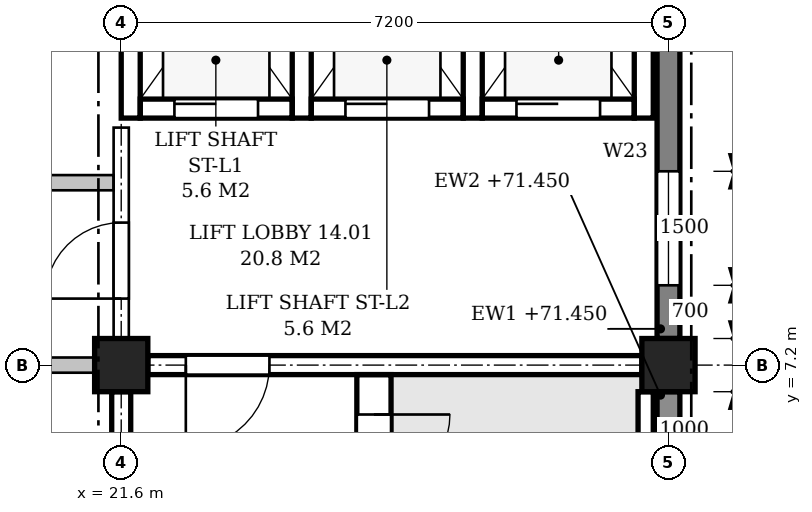
"""IFC4 building model, lengths in metres.
Left out: names, types, materials, properties, quantities, classifications, styles, units other than length and angle.
Written with IfcOpenShell. Run it as: python <this file> out.ifc"""

import sys

from ifc_helpers import new_model, si_unit, direction, frame, frame_2d, origin, origin_2d, place, context, subcontext, project, spatial, polyline, rectangle, outline, extrude, element, fill, save


model = new_model("IFC4")
c1 = context("Model", 3, precision=1e-05, world=origin(), true_north=direction((0.0, 1.0)))
c2 = subcontext(c1, "Body", "Model", "MODEL_VIEW")
j1 = project(units=[si_unit("LENGTHUNIT", "METRE"), si_unit("PLANEANGLEUNIT", "RADIAN")], contexts=[c1])
p1 = place(None, origin())
s1 = spatial("IfcSite", under=j1, at=p1, CompositionType="ELEMENT")
p2 = place(p1, origin())
s2 = spatial("IfcBuilding", under=s1, at=p2, CompositionType="ELEMENT")
p3 = place(p2, frame((0.0, 0.0, 67.8)))
s3 = spatial("IfcBuildingStorey", under=s2, at=p3, CompositionType="ELEMENT", Elevation=67.8)
for number, where, z_axis, x_axis in (
    (1, (21.6, 7.2, 0.0), (0.0, 0.0, 1.0), (1.0, 0.0, 0.0)),
    (2, (28.8, 7.2, 0.0), (0.0, 0.0, 1.0), (1.0, 0.0, 0.0)),
):
    element("IfcColumn", number, at=place(p3, frame(where, z_axis=z_axis, x_axis=x_axis)), inside=s3, PredefinedType="COLUMN", context=c2, shape_type="SweptSolid", body=[
        extrude(rectangle(XDim=0.7, YDim=0.7, at=origin_2d()), origin(), (0.0, 0.0, 1.0), 4.5),
    ])
p4 = place(p3, frame((28.8, 0.35, 0.0), z_axis=(0.0, 0.0, 1.0), x_axis=(0.0, 1.0, 0.0)))
e3 = element("IfcWall", 3, at=p4, inside=s3, PredefinedType="STANDARD", context=c2, shape_type="SweptSolid", body=[
    extrude(rectangle(XDim=6.5, YDim=0.3, at=frame_2d((3.25, 0.0))), origin(), (0.0, 0.0, 1.0), 3.65),
])
p5 = place(p4, frame((1.0, 0.0, 0.9)))
e4 = element("IfcOpeningElement", 4, at=p5, cuts=e3, PredefinedType="OPENING", context=c2, shape_type="SweptSolid", body=[
    extrude(outline(polyline([(0.0, 0.0), (0.9, 0.0), (0.9, 2.25), (0.45, 2.7), (0.0, 2.25), (0.0, 0.0)])), frame((0.0, 0.16, 0.0), z_axis=(0.0, -1.0, 0.0), x_axis=(1.0, 0.0, 0.0)), (0.0, 0.0, 1.0), 0.32),
])
p6 = place(p4, frame((4.6, 0.0, 0.9)))
e5 = element("IfcOpeningElement", 5, at=p6, cuts=e3, PredefinedType="OPENING", context=c2, shape_type="SweptSolid", body=[
    extrude(outline(polyline([(0.0, 0.0), (0.9, 0.0), (0.9, 2.25), (0.45, 2.7), (0.0, 2.25), (0.0, 0.0)])), frame((0.0, 0.16, 0.0), z_axis=(0.0, -1.0, 0.0), x_axis=(1.0, 0.0, 0.0)), (0.0, 0.0, 1.0), 0.32),
])
p7 = place(p3, frame((28.8, 7.55, 0.0), z_axis=(0.0, 0.0, 1.0), x_axis=(0.0, 1.0, 0.0)))
e6 = element("IfcWall", 6, at=p7, inside=s3, PredefinedType="STANDARD", context=c2, shape_type="SweptSolid", body=[
    extrude(rectangle(XDim=6.5, YDim=0.3, at=frame_2d((3.25, 0.0))), origin(), (0.0, 0.0, 1.0), 3.65),
])
p8 = place(p7, frame((0.7, 0.0, 0.9)))
e7 = element("IfcOpeningElement", 7, at=p8, cuts=e6, PredefinedType="OPENING", context=c2, shape_type="SweptSolid", body=[
    extrude(outline(polyline([(0.0, 0.0), (1.5, 0.0), (1.5, 1.95), (0.75, 2.7), (0.0, 1.95), (0.0, 0.0)])), frame((0.0, 0.16, 0.0), z_axis=(0.0, -1.0, 0.0), x_axis=(1.0, 0.0, 0.0)), (0.0, 0.0, 1.0), 0.32),
])
p9 = place(p3, frame((21.95, 7.2, 0.0), z_axis=(0.0, 0.0, 1.0), x_axis=(1.0, 0.0, 0.0)))
e8 = element("IfcWall", 8, at=p9, inside=s3, PredefinedType="SHEAR", context=c2, shape_type="SweptSolid", body=[
    extrude(rectangle(XDim=6.5, YDim=0.25, at=frame_2d((3.25, 0.0))), origin(), (0.0, 0.0, 1.0), 3.6),
])
p10 = place(p9, frame((0.5, 0.0, 0.0)))
e9 = element("IfcOpeningElement", 9, at=p10, cuts=e8, PredefinedType="OPENING", context=c2, shape_type="SweptSolid", body=[
    extrude(rectangle(XDim=1.1, YDim=2.1, at=frame_2d((0.55, 1.05))), frame((0.0, 0.135, 0.0), z_axis=(0.0, -1.0, 0.0), x_axis=(1.0, 0.0, 0.0)), (0.0, 0.0, 1.0), 0.27),
])
p11 = place(p3, frame((21.6, 0.35, 0.0), z_axis=(0.0, 0.0, 1.0), x_axis=(0.0, 1.0, 0.0)))
e10 = element("IfcWall", 10, at=p11, inside=s3, PredefinedType="SHEAR", context=c2, shape_type="SweptSolid", body=[
    extrude(rectangle(XDim=6.5, YDim=0.25, at=frame_2d((3.25, 0.0))), origin(), (0.0, 0.0, 1.0), 3.6),
])
p12 = place(p3, frame((28.5, 5.85, -0.25), z_axis=(0.0, 0.0, 1.0), x_axis=(0.0, 1.0, 0.0)))
e11 = element("IfcWall", 11, at=p12, inside=s3, PredefinedType="SHEAR", context=c2, shape_type="SweptSolid", body=[
    extrude(rectangle(XDim=1.0, YDim=0.2, at=frame_2d((0.5, 0.0))), origin(), (0.0, 0.0, 1.0), 4.5),
])
p13 = place(p3, frame((24.925, 0.15, 0.0), z_axis=(0.0, 0.0, 1.0), x_axis=(0.0, 1.0, 0.0)))
e12 = element("IfcWall", 12, at=p13, inside=s3, PredefinedType="SHEAR", context=c2, shape_type="SweptSolid", body=[
    extrude(rectangle(XDim=6.925, YDim=0.45, at=frame_2d((3.462, 0.0))), origin(), (0.0, 0.0, 1.0), 4.25),
])
p14 = place(p13, frame((5.4, 0.0, 0.0)))
e13 = element("IfcOpeningElement", 13, at=p14, cuts=e12, PredefinedType="OPENING", context=c2, shape_type="SweptSolid", body=[
    extrude(rectangle(XDim=1.0, YDim=2.1, at=frame_2d((0.5, 1.05))), frame((0.0, 0.235, 0.0), z_axis=(0.0, -1.0, 0.0), x_axis=(1.0, 0.0, 0.0)), (0.0, 0.0, 1.0), 0.47),
])
p15 = place(p3, frame((21.725, 10.45, -0.25), z_axis=(0.0, 0.0, 1.0), x_axis=(0.0, 1.0, 0.0)))
e14 = element("IfcWall", 14, at=p15, inside=s3, PredefinedType="SHEAR", context=c2, shape_type="SweptSolid", body=[
    extrude(rectangle(XDim=3.6, YDim=0.25, at=frame_2d((1.8, 0.0))), origin(), (0.0, 0.0, 1.0), 3.85),
])
for number, where, z_axis, x_axis in (
    (15, (23.975, 10.45, -0.25), (0.0, 0.0, 1.0), (0.0, 1.0, 0.0)),
    (16, (26.225, 10.45, -0.25), (0.0, 0.0, 1.0), (0.0, 1.0, 0.0)),
):
    element("IfcWall", number, at=place(p3, frame(where, z_axis=z_axis, x_axis=x_axis)), inside=s3, PredefinedType="SHEAR", context=c2, shape_type="SweptSolid", body=[
        extrude(rectangle(XDim=3.3, YDim=0.25, at=frame_2d((1.65, 0.0))), origin(), (0.0, 0.0, 1.0), 4.5),
    ])
p16 = place(p3, frame((28.475, 10.45, -0.25), z_axis=(0.0, 0.0, 1.0), x_axis=(0.0, 1.0, 0.0)))
e17 = element("IfcWall", 17, at=p16, inside=s3, PredefinedType="SHEAR", context=c2, shape_type="SweptSolid", body=[
    extrude(rectangle(XDim=3.6, YDim=0.25, at=frame_2d((1.8, 0.0))), origin(), (0.0, 0.0, 1.0), 4.5),
])
p17 = place(p3, frame((21.85, 10.575, -0.25), z_axis=(0.0, 0.0, 1.0), x_axis=(1.0, 0.0, 0.0)))
e18 = element("IfcWall", 18, at=p17, inside=s3, PredefinedType="SHEAR", context=c2, shape_type="SweptSolid", body=[
    extrude(rectangle(XDim=2.0, YDim=0.25, at=frame_2d((1.0, 0.0))), origin(), (0.0, 0.0, 1.0), 4.5),
])
p18 = place(p17, frame((0.45, 0.0, 0.25)))
e19 = element("IfcOpeningElement", 19, at=p18, cuts=e18, PredefinedType="OPENING", context=c2, shape_type="SweptSolid", body=[
    extrude(rectangle(XDim=1.1, YDim=2.1, at=frame_2d((0.55, 1.05))), frame((0.0, 0.135, 0.0), z_axis=(0.0, -1.0, 0.0), x_axis=(1.0, 0.0, 0.0)), (0.0, 0.0, 1.0), 0.27),
])
p19 = place(p3, frame((24.1, 10.575, -0.25), z_axis=(0.0, 0.0, 1.0), x_axis=(1.0, 0.0, 0.0)))
e20 = element("IfcWall", 20, at=p19, inside=s3, PredefinedType="SHEAR", context=c2, shape_type="SweptSolid", body=[
    extrude(rectangle(XDim=2.0, YDim=0.25, at=frame_2d((1.0, 0.0))), origin(), (0.0, 0.0, 1.0), 4.5),
])
p20 = place(p19, frame((0.45, 0.0, 0.25)))
e21 = element("IfcOpeningElement", 21, at=p20, cuts=e20, PredefinedType="OPENING", context=c2, shape_type="SweptSolid", body=[
    extrude(rectangle(XDim=1.1, YDim=2.1, at=frame_2d((0.55, 1.05))), frame((0.0, 0.135, 0.0), z_axis=(0.0, -1.0, 0.0), x_axis=(1.0, 0.0, 0.0)), (0.0, 0.0, 1.0), 0.27),
])
p21 = place(p3, frame((26.35, 10.575, -0.25), z_axis=(0.0, 0.0, 1.0), x_axis=(1.0, 0.0, 0.0)))
e22 = element("IfcWall", 22, at=p21, inside=s3, PredefinedType="SHEAR", context=c2, shape_type="SweptSolid", body=[
    extrude(rectangle(XDim=2.0, YDim=0.25, at=frame_2d((1.0, 0.0))), origin(), (0.0, 0.0, 1.0), 4.5),
])
p22 = place(p21, frame((0.45, 0.0, 0.25)))
e23 = element("IfcOpeningElement", 23, at=p22, cuts=e22, PredefinedType="OPENING", context=c2, shape_type="SweptSolid", body=[
    extrude(rectangle(XDim=1.1, YDim=2.1, at=frame_2d((0.55, 1.05))), frame((0.0, 0.135, 0.0), z_axis=(0.0, -1.0, 0.0), x_axis=(1.0, 0.0, 0.0)), (0.0, 0.0, 1.0), 0.27),
])
p23 = place(p3, frame((14.75, 7.2, 0.0), z_axis=(0.0, 0.0, 1.0), x_axis=(1.0, 0.0, 0.0)))
e24 = element("IfcWall", 24, at=p23, inside=s3, PredefinedType="PARTITIONING", context=c2, shape_type="SweptSolid", body=[
    extrude(rectangle(XDim=6.5, YDim=0.2, at=frame_2d((3.25, 0.0))), origin(), (0.0, 0.0, 1.0), 3.6),
])
p24 = place(p23, frame((4.375, 0.0, 0.0)))
e25 = element("IfcOpeningElement", 25, at=p24, cuts=e24, PredefinedType="OPENING", context=c2, shape_type="SweptSolid", body=[
    extrude(rectangle(XDim=1.0, YDim=2.1, at=frame_2d((0.5, 1.05))), frame((0.0, 0.11, 0.0), z_axis=(0.0, -1.0, 0.0), x_axis=(1.0, 0.0, 0.0)), (0.0, 0.0, 1.0), 0.22),
])
p25 = place(p3, frame((3.5, 9.6, 0.0), z_axis=(0.0, 0.0, 1.0), x_axis=(1.0, 0.0, 0.0)))
e26 = element("IfcWall", 26, at=p25, inside=s3, PredefinedType="PARTITIONING", context=c2, shape_type="SweptSolid", body=[
    extrude(outline(polyline([(0.0, 0.0), (18.0, 0.0), (18.0, 3.6), (17.9, 3.6), (17.9, 4.25), (11.1, 4.25), (11.1, 3.6), (10.7, 3.6), (10.7, 4.25), (3.9, 4.25), (3.9, 3.6), (3.5, 3.6), (3.5, 4.25), (0.0, 4.25), (0.0, 0.0)])), frame((0.0, 0.1, 0.0), z_axis=(0.0, -1.0, 0.0), x_axis=(1.0, 0.0, 0.0)), (0.0, 0.0, 1.0), 0.2),
])
p26 = place(p25, frame((15.75, 0.0, 0.0)))
e27 = element("IfcOpeningElement", 27, at=p26, cuts=e26, PredefinedType="OPENING", context=c2, shape_type="SweptSolid", body=[
    extrude(rectangle(XDim=1.0, YDim=2.1, at=frame_2d((0.5, 1.05))), frame((0.0, 0.11, 0.0), z_axis=(0.0, -1.0, 0.0), x_axis=(1.0, 0.0, 0.0)), (0.0, 0.0, 1.0), 0.22),
])
p27 = place(p25, frame((1.4, 0.0, 0.0)))
e28 = element("IfcOpeningElement", 28, at=p27, cuts=e26, PredefinedType="OPENING", context=c2, shape_type="SweptSolid", body=[
    extrude(rectangle(XDim=1.0, YDim=2.1, at=frame_2d((0.5, 1.05))), frame((0.0, 0.11, 0.0), z_axis=(0.0, -1.0, 0.0), x_axis=(1.0, 0.0, 0.0)), (0.0, 0.0, 1.0), 0.22),
])
p28 = place(p25, frame((5.0, 0.0, 0.0)))
e29 = element("IfcOpeningElement", 29, at=p28, cuts=e26, PredefinedType="OPENING", context=c2, shape_type="SweptSolid", body=[
    extrude(rectangle(XDim=1.0, YDim=2.1, at=frame_2d((0.5, 1.05))), frame((0.0, 0.11, 0.0), z_axis=(0.0, -1.0, 0.0), x_axis=(1.0, 0.0, 0.0)), (0.0, 0.0, 1.0), 0.22),
])
p29 = place(p25, frame((8.6, 0.0, 0.0)))
e30 = element("IfcOpeningElement", 30, at=p29, cuts=e26, PredefinedType="OPENING", context=c2, shape_type="SweptSolid", body=[
    extrude(rectangle(XDim=1.0, YDim=2.1, at=frame_2d((0.5, 1.05))), frame((0.0, 0.11, 0.0), z_axis=(0.0, -1.0, 0.0), x_axis=(1.0, 0.0, 0.0)), (0.0, 0.0, 1.0), 0.22),
])
p30 = place(p25, frame((12.2, 0.0, 0.0)))
e31 = element("IfcOpeningElement", 31, at=p30, cuts=e26, PredefinedType="OPENING", context=c2, shape_type="SweptSolid", body=[
    extrude(rectangle(XDim=1.0, YDim=2.1, at=frame_2d((0.5, 1.05))), frame((0.0, 0.11, 0.0), z_axis=(0.0, -1.0, 0.0), x_axis=(1.0, 0.0, 0.0)), (0.0, 0.0, 1.0), 0.22),
])
p31 = place(p3, frame((21.6, 7.55, 0.0), z_axis=(0.0, 0.0, 1.0), x_axis=(0.0, 1.0, 0.0)))
e32 = element("IfcWall", 32, at=p31, inside=s3, PredefinedType="PARTITIONING", context=c2, shape_type="SweptSolid", body=[
    extrude(rectangle(XDim=2.775, YDim=0.2, at=frame_2d((1.387, 0.0))), origin(), (0.0, 0.0, 1.0), 3.6),
])
p32 = place(p31, frame((0.525, 0.0, 0.0)))
e33 = element("IfcOpeningElement", 33, at=p32, cuts=e32, PredefinedType="OPENING", context=c2, shape_type="SweptSolid", body=[
    extrude(rectangle(XDim=1.0, YDim=2.1, at=frame_2d((0.5, 1.05))), frame((0.0, 0.11, 0.0), z_axis=(0.0, -1.0, 0.0), x_axis=(1.0, 0.0, 0.0)), (0.0, 0.0, 1.0), 0.22),
])
p33 = place(p8, origin())
e34 = element("IfcWindow", 34, at=p33, inside=s3, PartitioningType="SINGLE_PANEL", PredefinedType="WINDOW", context=c2, shape_type="SweptSolid", body=[
    extrude(outline(polyline([(0.0, 0.0), (1.5, 0.0), (1.5, 1.95), (0.75, 2.7), (0.0, 1.95), (0.0, 0.0)])), frame((0.0, 0.03, 0.0), z_axis=(0.0, -1.0, 0.0), x_axis=(1.0, 0.0, 0.0)), (0.0, 0.0, 1.0), 0.06),
])
fill(e7, e34)
p34 = place(p14, frame((1.0, 0.0, 0.0), z_axis=(0.0, 0.0, 1.0), x_axis=(-1.0, 0.0, 0.0)))
e35 = element("IfcDoor", 35, at=p34, inside=s3, OperationType="SINGLE_SWING_LEFT", PredefinedType="DOOR", context=c2, shape_type="SweptSolid", body=[
    extrude(rectangle(XDim=1.0, YDim=2.1, at=frame_2d((0.5, 1.05))), frame((0.0, 0.025, 0.0), z_axis=(0.0, -1.0, 0.0), x_axis=(1.0, 0.0, 0.0)), (0.0, 0.0, 1.0), 0.05),
])
fill(e13, e35)
p35 = place(p10, frame((1.1, 0.0, 0.0), z_axis=(0.0, 0.0, 1.0), x_axis=(-1.0, 0.0, 0.0)))
e36 = element("IfcDoor", 36, at=p35, inside=s3, OperationType="SINGLE_SWING_RIGHT", PredefinedType="DOOR", context=c2, shape_type="SweptSolid", body=[
    extrude(rectangle(XDim=1.1, YDim=2.1, at=frame_2d((0.55, 1.05))), frame((0.0, 0.025, 0.0), z_axis=(0.0, -1.0, 0.0), x_axis=(1.0, 0.0, 0.0)), (0.0, 0.0, 1.0), 0.05),
])
fill(e9, e36)
p36 = place(p18, origin())
e37 = element("IfcDoor", 37, at=p36, inside=s3, OperationType="SLIDING_TO_LEFT", PredefinedType="DOOR", context=c2, shape_type="SweptSolid", body=[
    extrude(rectangle(XDim=1.1, YDim=2.1, at=frame_2d((0.55, 1.05))), frame((0.0, 0.025, 0.0), z_axis=(0.0, -1.0, 0.0), x_axis=(1.0, 0.0, 0.0)), (0.0, 0.0, 1.0), 0.05),
])
fill(e19, e37)
p37 = place(p20, origin())
e38 = element("IfcDoor", 38, at=p37, inside=s3, OperationType="SLIDING_TO_LEFT", PredefinedType="DOOR", context=c2, shape_type="SweptSolid", body=[
    extrude(rectangle(XDim=1.1, YDim=2.1, at=frame_2d((0.55, 1.05))), frame((0.0, 0.025, 0.0), z_axis=(0.0, -1.0, 0.0), x_axis=(1.0, 0.0, 0.0)), (0.0, 0.0, 1.0), 0.05),
])
fill(e21, e38)
p38 = place(p22, origin())
e39 = element("IfcDoor", 39, at=p38, inside=s3, OperationType="SLIDING_TO_LEFT", PredefinedType="DOOR", context=c2, shape_type="SweptSolid", body=[
    extrude(rectangle(XDim=1.1, YDim=2.1, at=frame_2d((0.55, 1.05))), frame((0.0, 0.025, 0.0), z_axis=(0.0, -1.0, 0.0), x_axis=(1.0, 0.0, 0.0)), (0.0, 0.0, 1.0), 0.05),
])
fill(e23, e39)
p39 = place(p32, origin())
e40 = element("IfcDoor", 40, at=p39, inside=s3, OperationType="SINGLE_SWING_LEFT", PredefinedType="DOOR", context=c2, shape_type="SweptSolid", body=[
    extrude(rectangle(XDim=1.0, YDim=2.1, at=frame_2d((0.5, 1.05))), frame((0.0, 0.025, 0.0), z_axis=(0.0, -1.0, 0.0), x_axis=(1.0, 0.0, 0.0)), (0.0, 0.0, 1.0), 0.05),
])
fill(e33, e40)
save(model, sys.argv[1])
